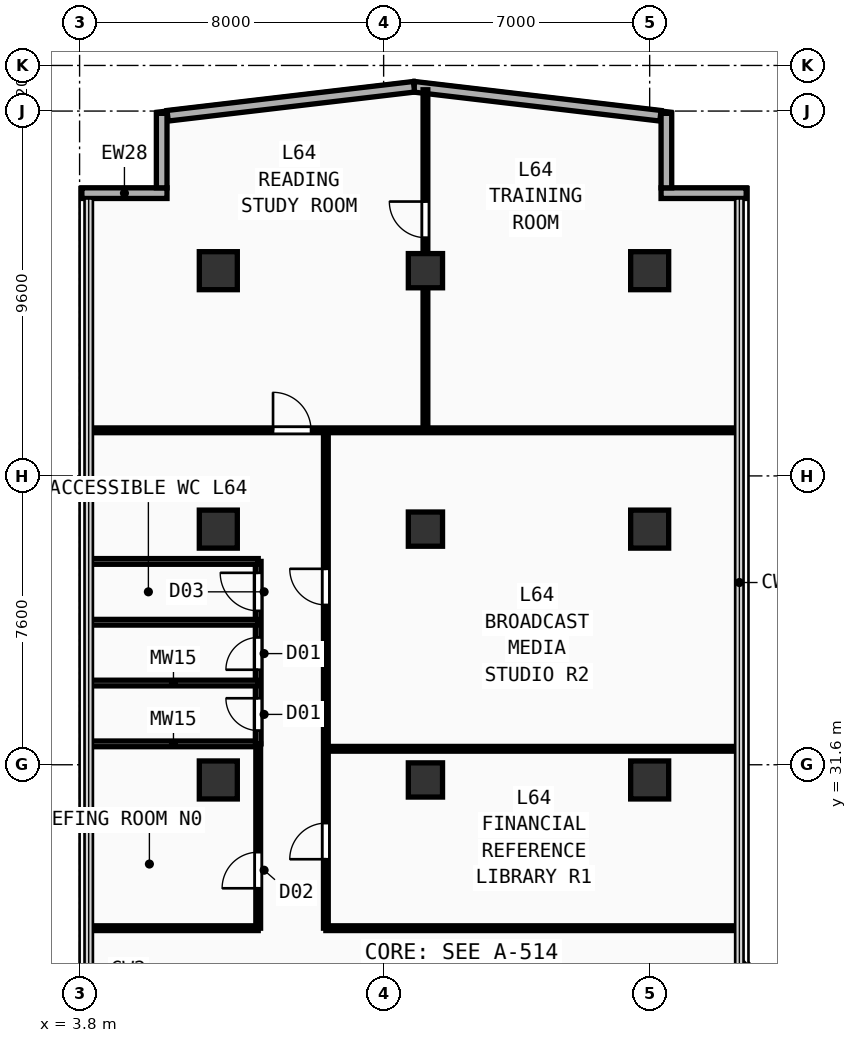
"""IFC4 building model, lengths in metres.
Left out: names, types, materials, properties, quantities, classifications, styles, units other than length and angle.
Written with IfcOpenShell. Run it as: python <this file> out.ifc"""

import sys

from ifc_helpers import new_model, si_unit, direction, frame, frame_2d, origin, origin_2d, place, context, subcontext, project, spatial, rectangle, extrude, element, fill, save


model = new_model("IFC4")
c1 = context("Model", 3, precision=1e-05, world=origin(), true_north=direction((0.0, 1.0)))
c2 = subcontext(c1, "Body", "Model", "MODEL_VIEW")
j1 = project(units=[si_unit("LENGTHUNIT", "METRE"), si_unit("PLANEANGLEUNIT", "RADIAN")], contexts=[c1])
p1 = place(None, origin())
s1 = spatial("IfcSite", under=j1, at=p1, CompositionType="ELEMENT")
p2 = place(p1, origin())
s2 = spatial("IfcBuilding", under=s1, at=p2, CompositionType="ELEMENT")
p3 = place(p2, frame((0.0, 0.0, 250.1)))
s3 = spatial("IfcBuildingStorey", under=s2, at=p3, CompositionType="ELEMENT", Elevation=250.1)
for number, where, z_axis, x_axis in (
    (1, (7.45, 31.2, 0.0), (0.0, 0.0, 1.0), (1.0, 0.0, 0.0)),
    (2, (7.45, 37.8, 0.0), (0.0, 0.0, 1.0), (1.0, 0.0, 0.0)),
    (3, (7.45, 44.6, 0.0), (0.0, 0.0, 1.0), (1.0, 0.0, 0.0)),
    (4, (18.8, 31.2, 0.0), (0.0, 0.0, 1.0), (1.0, 0.0, 0.0)),
    (5, (18.8, 37.8, 0.0), (0.0, 0.0, 1.0), (1.0, 0.0, 0.0)),
    (6, (18.8, 44.6, 0.0), (0.0, 0.0, 1.0), (1.0, 0.0, 0.0)),
):
    element("IfcColumn", number, at=place(p3, frame(where, z_axis=z_axis, x_axis=x_axis)), inside=s3, PredefinedType="COLUMN", context=c2, shape_type="SweptSolid", body=[
        extrude(rectangle(XDim=1.0, YDim=1.0, at=origin_2d()), origin(), (0.0, 0.0, 1.0), 3.56),
    ])
for number, where, z_axis, x_axis in (
    (7, (12.9, 31.2, 0.0), (0.0, 0.0, 1.0), (1.0, 0.0, 0.0)),
    (8, (12.9, 37.8, 0.0), (0.0, 0.0, 1.0), (1.0, 0.0, 0.0)),
    (9, (12.9, 44.6, 0.0), (0.0, 0.0, 1.0), (1.0, 0.0, 0.0)),
):
    element("IfcColumn", number, at=place(p3, frame(where, z_axis=z_axis, x_axis=x_axis)), inside=s3, PredefinedType="COLUMN", context=c2, shape_type="SweptSolid", body=[
        extrude(rectangle(XDim=0.9, YDim=0.9, at=origin_2d()), origin(), (0.0, 0.0, 1.0), 3.56),
    ])
p4 = place(p3, frame((19.1, 46.64, 0.0), z_axis=(0.0, 0.0, 1.0), x_axis=(1.0, 0.0, 0.0)))
e10 = element("IfcWall", 10, at=p4, inside=s3, PredefinedType="SOLIDWALL", context=c2, shape_type="SweptSolid", body=[
    extrude(rectangle(XDim=2.24, YDim=0.28, at=frame_2d((1.12, 0.0))), origin(), (0.0, 0.0, 1.0), 3.56),
])
p5 = place(p3, frame((19.24, 46.78, 0.0), z_axis=(0.0, 0.0, 1.0), x_axis=(0.0, 1.0, 0.0)))
e11 = element("IfcWall", 11, at=p5, inside=s3, PredefinedType="SOLIDWALL", context=c2, shape_type="SweptSolid", body=[
    extrude(rectangle(XDim=1.96, YDim=0.28, at=frame_2d((0.98, 0.0))), origin(), (0.0, 0.0, 1.0), 3.56),
])
p6 = place(p3, frame((3.86, 46.64, 0.0), z_axis=(0.0, 0.0, 1.0), x_axis=(1.0, 0.0, 0.0)))
e12 = element("IfcWall", 12, at=p6, inside=s3, PredefinedType="SOLIDWALL", context=c2, shape_type="SweptSolid", body=[
    extrude(rectangle(XDim=2.24, YDim=0.28, at=frame_2d((1.12, 0.0))), origin(), (0.0, 0.0, 1.0), 3.56),
])
p7 = place(p3, frame((5.96, 46.78, 0.0), z_axis=(0.0, 0.0, 1.0), x_axis=(0.0, 1.0, 0.0)))
e13 = element("IfcWall", 13, at=p7, inside=s3, PredefinedType="SOLIDWALL", context=c2, shape_type="SweptSolid", body=[
    extrude(rectangle(XDim=1.96, YDim=0.28, at=frame_2d((0.98, 0.0))), origin(), (0.0, 0.0, 1.0), 3.56),
])
p8 = place(p3, frame((27.685, 19.775, 0.0), z_axis=(0.0, 0.0, 1.0), x_axis=(-0.707106781187, 0.707106781187, 0.0)))
e14 = element("IfcWall", 14, at=p8, inside=s3, PredefinedType="SOLIDWALL", context=c2, shape_type="SweptSolid", body=[
    extrude(rectangle(XDim=9.207, YDim=0.28, at=frame_2d((4.603, 0.0))), origin(), (0.0, 0.0, 1.0), 3.56),
])
for number, where, z_axis, x_axis in (
    (15, (19.083, 48.676, 0.0), (0.0, 0.0, 1.0), (-0.993, 0.117, 0.0)),
    (16, (12.599, 49.439, 0.0), (0.0, 0.0, 1.0), (-0.993, -0.117, 0.0)),
):
    element("IfcWall", number, at=place(p3, frame(where, z_axis=z_axis, x_axis=x_axis)), inside=s3, PredefinedType="SOLIDWALL", context=c2, shape_type="SweptSolid", body=[
        extrude(rectangle(XDim=6.527, YDim=0.28, at=frame_2d((3.263, 0.0))), origin(), (0.0, 0.0, 1.0), 3.56),
    ])
p9 = place(p3, frame((8.5, 27.3, 0.0), z_axis=(0.0, 0.0, 1.0), x_axis=(0.0, 1.0, 0.0)))
e17 = element("IfcWall", 17, at=p9, inside=s3, PredefinedType="PARTITIONING", context=c2, shape_type="SweptSolid", body=[
    extrude(rectangle(XDim=4.85, YDim=0.125, at=frame_2d((2.425, 0.0))), origin(), (0.0, 0.0, 1.0), 3.56),
])
p10 = place(p9, frame((1.05, 0.0, 0.0)))
e18 = element("IfcOpeningElement", 18, at=p10, cuts=e17, PredefinedType="OPENING", context=c2, shape_type="SweptSolid", body=[
    extrude(rectangle(XDim=0.95, YDim=2.15, at=frame_2d((0.475, 1.075))), frame((0.0, 0.073, 0.0), z_axis=(0.0, -1.0, 0.0), x_axis=(1.0, 0.0, 0.0)), (0.0, 0.0, 1.0), 0.145),
])
p11 = place(p3, frame((4.04, 27.3, 0.0), z_axis=(0.0, 0.0, 1.0), x_axis=(1.0, 0.0, 0.0)))
e19 = element("IfcWall", 19, at=p11, inside=s3, PredefinedType="PARTITIONING", context=c2, shape_type="SweptSolid", body=[
    extrude(rectangle(XDim=4.46, YDim=0.125, at=frame_2d((2.23, 0.0))), origin(), (0.0, 0.0, 1.0), 3.56),
])
p12 = place(p3, frame((4.04, 32.15, 0.0), z_axis=(0.0, 0.0, 1.0), x_axis=(1.0, 0.0, 0.0)))
e20 = element("IfcWall", 20, at=p12, inside=s3, PredefinedType="PLUMBINGWALL", context=c2, shape_type="SweptSolid", body=[
    extrude(rectangle(XDim=4.46, YDim=0.15, at=frame_2d((2.23, 0.0))), origin(), (0.0, 0.0, 1.0), 3.56),
])
p13 = place(p3, frame((8.5, 32.15, 0.0), z_axis=(0.0, 0.0, 1.0), x_axis=(0.0, 1.0, 0.0)))
e21 = element("IfcWall", 21, at=p13, inside=s3, PredefinedType="PLUMBINGWALL", context=c2, shape_type="SweptSolid", body=[
    extrude(rectangle(XDim=4.8, YDim=0.15, at=frame_2d((2.4, 0.0))), origin(), (0.0, 0.0, 1.0), 3.56),
])
p14 = place(p13, frame((0.35, 0.0, 0.0)))
e22 = element("IfcOpeningElement", 22, at=p14, cuts=e21, PredefinedType="OPENING", context=c2, shape_type="SweptSolid", body=[
    extrude(rectangle(XDim=0.85, YDim=2.15, at=frame_2d((0.425, 1.075))), frame((0.0, 0.085, 0.0), z_axis=(0.0, -1.0, 0.0), x_axis=(1.0, 0.0, 0.0)), (0.0, 0.0, 1.0), 0.17),
])
p15 = place(p13, frame((1.95, 0.0, 0.0)))
e23 = element("IfcOpeningElement", 23, at=p15, cuts=e21, PredefinedType="OPENING", context=c2, shape_type="SweptSolid", body=[
    extrude(rectangle(XDim=0.85, YDim=2.15, at=frame_2d((0.425, 1.075))), frame((0.0, 0.085, 0.0), z_axis=(0.0, -1.0, 0.0), x_axis=(1.0, 0.0, 0.0)), (0.0, 0.0, 1.0), 0.17),
])
p16 = place(p13, frame((3.5, 0.0, 0.0)))
e24 = element("IfcOpeningElement", 24, at=p16, cuts=e21, PredefinedType="OPENING", context=c2, shape_type="SweptSolid", body=[
    extrude(rectangle(XDim=1.0, YDim=2.2, at=frame_2d((0.5, 1.1))), frame((0.0, 0.085, 0.0), z_axis=(0.0, -1.0, 0.0), x_axis=(1.0, 0.0, 0.0)), (0.0, 0.0, 1.0), 0.17),
])
for number, where, z_axis, x_axis in (
    (25, (4.04, 33.75, 0.0), (0.0, 0.0, 1.0), (1.0, 0.0, 0.0)),
    (26, (4.04, 35.35, 0.0), (0.0, 0.0, 1.0), (1.0, 0.0, 0.0)),
):
    element("IfcWall", number, at=place(p3, frame(where, z_axis=z_axis, x_axis=x_axis)), inside=s3, PredefinedType="PLUMBINGWALL", context=c2, shape_type="SweptSolid", body=[
        extrude(rectangle(XDim=4.46, YDim=0.15, at=frame_2d((2.23, 0.0))), origin(), (0.0, 0.0, 1.0), 3.26),
    ])
p17 = place(p3, frame((4.04, 36.95, 0.0), z_axis=(0.0, 0.0, 1.0), x_axis=(1.0, 0.0, 0.0)))
e27 = element("IfcWall", 27, at=p17, inside=s3, PredefinedType="PLUMBINGWALL", context=c2, shape_type="SweptSolid", body=[
    extrude(rectangle(XDim=4.46, YDim=0.15, at=frame_2d((2.23, 0.0))), origin(), (0.0, 0.0, 1.0), 3.56),
])
p18 = place(p3, frame((4.04, 40.4, 0.0), z_axis=(0.0, 0.0, 1.0), x_axis=(1.0, 0.0, 0.0)))
e28 = element("IfcWall", 28, at=p18, inside=s3, PredefinedType="PARTITIONING", context=c2, shape_type="SweptSolid", body=[
    extrude(rectangle(XDim=17.12, YDim=0.125, at=frame_2d((8.56, 0.0))), origin(), (0.0, 0.0, 1.0), 3.56),
])
p19 = place(p18, frame((4.85, 0.0, 0.0)))
e29 = element("IfcOpeningElement", 29, at=p19, cuts=e28, PredefinedType="OPENING", context=c2, shape_type="SweptSolid", body=[
    extrude(rectangle(XDim=1.0, YDim=2.2, at=frame_2d((0.5, 1.1))), frame((0.0, 0.073, 0.0), z_axis=(0.0, -1.0, 0.0), x_axis=(1.0, 0.0, 0.0)), (0.0, 0.0, 1.0), 0.145),
])
p20 = place(p3, frame((12.9, 40.4, 0.0), z_axis=(0.0, 0.0, 1.0), x_axis=(0.0, 1.0, 0.0)))
e30 = element("IfcWall", 30, at=p20, inside=s3, PredefinedType="PARTITIONING", context=c2, shape_type="SweptSolid", body=[
    extrude(rectangle(XDim=8.96, YDim=0.125, at=frame_2d((4.48, 0.0))), origin(), (0.0, 0.0, 1.0), 2.798),
])
p21 = place(p20, frame((5.069, 0.0, 0.0)))
e31 = element("IfcOpeningElement", 31, at=p21, cuts=e30, PredefinedType="OPENING", context=c2, shape_type="SweptSolid", body=[
    extrude(rectangle(XDim=0.95, YDim=2.15, at=frame_2d((0.475, 1.075))), frame((0.0, 0.073, 0.0), z_axis=(0.0, -1.0, 0.0), x_axis=(1.0, 0.0, 0.0)), (0.0, 0.0, 1.0), 0.145),
])
p22 = place(p3, frame((10.28, 27.3, 0.0), z_axis=(0.0, 0.0, 1.0), x_axis=(1.0, 0.0, 0.0)))
e32 = element("IfcWall", 32, at=p22, inside=s3, PredefinedType="PARTITIONING", context=c2, shape_type="SweptSolid", body=[
    extrude(rectangle(XDim=10.88, YDim=0.125, at=frame_2d((5.44, 0.0))), origin(), (0.0, 0.0, 1.0), 3.56),
])
p23 = place(p3, frame((10.28, 27.3, 0.0), z_axis=(0.0, 0.0, 1.0), x_axis=(0.0, 1.0, 0.0)))
e33 = element("IfcWall", 33, at=p23, inside=s3, PredefinedType="PARTITIONING", context=c2, shape_type="SweptSolid", body=[
    extrude(rectangle(XDim=13.1, YDim=0.125, at=frame_2d((6.55, 0.0))), origin(), (0.0, 0.0, 1.0), 3.56),
])
p24 = place(p23, frame((1.814, 0.0, 0.0)))
e34 = element("IfcOpeningElement", 34, at=p24, cuts=e33, PredefinedType="OPENING", context=c2, shape_type="SweptSolid", body=[
    extrude(rectangle(XDim=0.95, YDim=2.15, at=frame_2d((0.475, 1.075))), frame((0.0, 0.073, 0.0), z_axis=(0.0, -1.0, 0.0), x_axis=(1.0, 0.0, 0.0)), (0.0, 0.0, 1.0), 0.145),
])
p25 = place(p23, frame((8.506, 0.0, 0.0)))
e35 = element("IfcOpeningElement", 35, at=p25, cuts=e33, PredefinedType="OPENING", context=c2, shape_type="SweptSolid", body=[
    extrude(rectangle(XDim=0.95, YDim=2.15, at=frame_2d((0.475, 1.075))), frame((0.0, 0.073, 0.0), z_axis=(0.0, -1.0, 0.0), x_axis=(1.0, 0.0, 0.0)), (0.0, 0.0, 1.0), 0.145),
])
p26 = place(p3, frame((10.28, 32.02, 0.0), z_axis=(0.0, 0.0, 1.0), x_axis=(1.0, 0.0, 0.0)))
e36 = element("IfcWall", 36, at=p26, inside=s3, PredefinedType="PARTITIONING", context=c2, shape_type="SweptSolid", body=[
    extrude(rectangle(XDim=10.88, YDim=0.125, at=frame_2d((5.44, 0.0))), origin(), (0.0, 0.0, 1.0), 3.56),
])
p27 = place(p10, origin())
e37 = element("IfcDoor", 37, at=p27, inside=s3, OperationType="SINGLE_SWING_LEFT", PredefinedType="DOOR", context=c2, shape_type="SweptSolid", body=[
    extrude(rectangle(XDim=0.95, YDim=2.15, at=frame_2d((0.475, 1.075))), frame((0.0, 0.025, 0.0), z_axis=(0.0, -1.0, 0.0), x_axis=(1.0, 0.0, 0.0)), (0.0, 0.0, 1.0), 0.05),
])
fill(e18, e37)
p28 = place(p14, origin())
e38 = element("IfcDoor", 38, at=p28, inside=s3, OperationType="SINGLE_SWING_RIGHT", PredefinedType="DOOR", context=c2, shape_type="SweptSolid", body=[
    extrude(rectangle(XDim=0.85, YDim=2.15, at=frame_2d((0.425, 1.075))), frame((0.0, 0.025, 0.0), z_axis=(0.0, -1.0, 0.0), x_axis=(1.0, 0.0, 0.0)), (0.0, 0.0, 1.0), 0.05),
])
fill(e22, e38)
p29 = place(p15, origin())
e39 = element("IfcDoor", 39, at=p29, inside=s3, OperationType="SINGLE_SWING_LEFT", PredefinedType="DOOR", context=c2, shape_type="SweptSolid", body=[
    extrude(rectangle(XDim=0.85, YDim=2.15, at=frame_2d((0.425, 1.075))), frame((0.0, 0.025, 0.0), z_axis=(0.0, -1.0, 0.0), x_axis=(1.0, 0.0, 0.0)), (0.0, 0.0, 1.0), 0.05),
])
fill(e23, e39)
p30 = place(p16, origin())
e40 = element("IfcDoor", 40, at=p30, inside=s3, OperationType="SINGLE_SWING_RIGHT", PredefinedType="DOOR", context=c2, shape_type="SweptSolid", body=[
    extrude(rectangle(XDim=1.0, YDim=2.2, at=frame_2d((0.5, 1.1))), frame((0.0, 0.025, 0.0), z_axis=(0.0, -1.0, 0.0), x_axis=(1.0, 0.0, 0.0)), (0.0, 0.0, 1.0), 0.05),
])
fill(e24, e40)
p31 = place(p19, origin())
e41 = element("IfcDoor", 41, at=p31, inside=s3, OperationType="SINGLE_SWING_LEFT", PredefinedType="DOOR", context=c2, shape_type="SweptSolid", body=[
    extrude(rectangle(XDim=1.0, YDim=2.2, at=frame_2d((0.5, 1.1))), frame((0.0, 0.025, 0.0), z_axis=(0.0, -1.0, 0.0), x_axis=(1.0, 0.0, 0.0)), (0.0, 0.0, 1.0), 0.05),
])
fill(e29, e41)
p32 = place(p21, origin())
e42 = element("IfcDoor", 42, at=p32, inside=s3, OperationType="SINGLE_SWING_RIGHT", PredefinedType="DOOR", context=c2, shape_type="SweptSolid", body=[
    extrude(rectangle(XDim=0.95, YDim=2.15, at=frame_2d((0.475, 1.075))), frame((0.0, 0.025, 0.0), z_axis=(0.0, -1.0, 0.0), x_axis=(1.0, 0.0, 0.0)), (0.0, 0.0, 1.0), 0.05),
])
fill(e31, e42)
p33 = place(p24, origin())
e43 = element("IfcDoor", 43, at=p33, inside=s3, OperationType="SINGLE_SWING_LEFT", PredefinedType="DOOR", context=c2, shape_type="SweptSolid", body=[
    extrude(rectangle(XDim=0.95, YDim=2.15, at=frame_2d((0.475, 1.075))), frame((0.0, 0.025, 0.0), z_axis=(0.0, -1.0, 0.0), x_axis=(1.0, 0.0, 0.0)), (0.0, 0.0, 1.0), 0.05),
])
fill(e34, e43)
p34 = place(p25, origin())
e44 = element("IfcDoor", 44, at=p34, inside=s3, OperationType="SINGLE_SWING_RIGHT", PredefinedType="DOOR", context=c2, shape_type="SweptSolid", body=[
    extrude(rectangle(XDim=0.95, YDim=2.15, at=frame_2d((0.475, 1.075))), frame((0.0, 0.025, 0.0), z_axis=(0.0, -1.0, 0.0), x_axis=(1.0, 0.0, 0.0)), (0.0, 0.0, 1.0), 0.05),
])
fill(e35, e44)
save(model, sys.argv[1])
